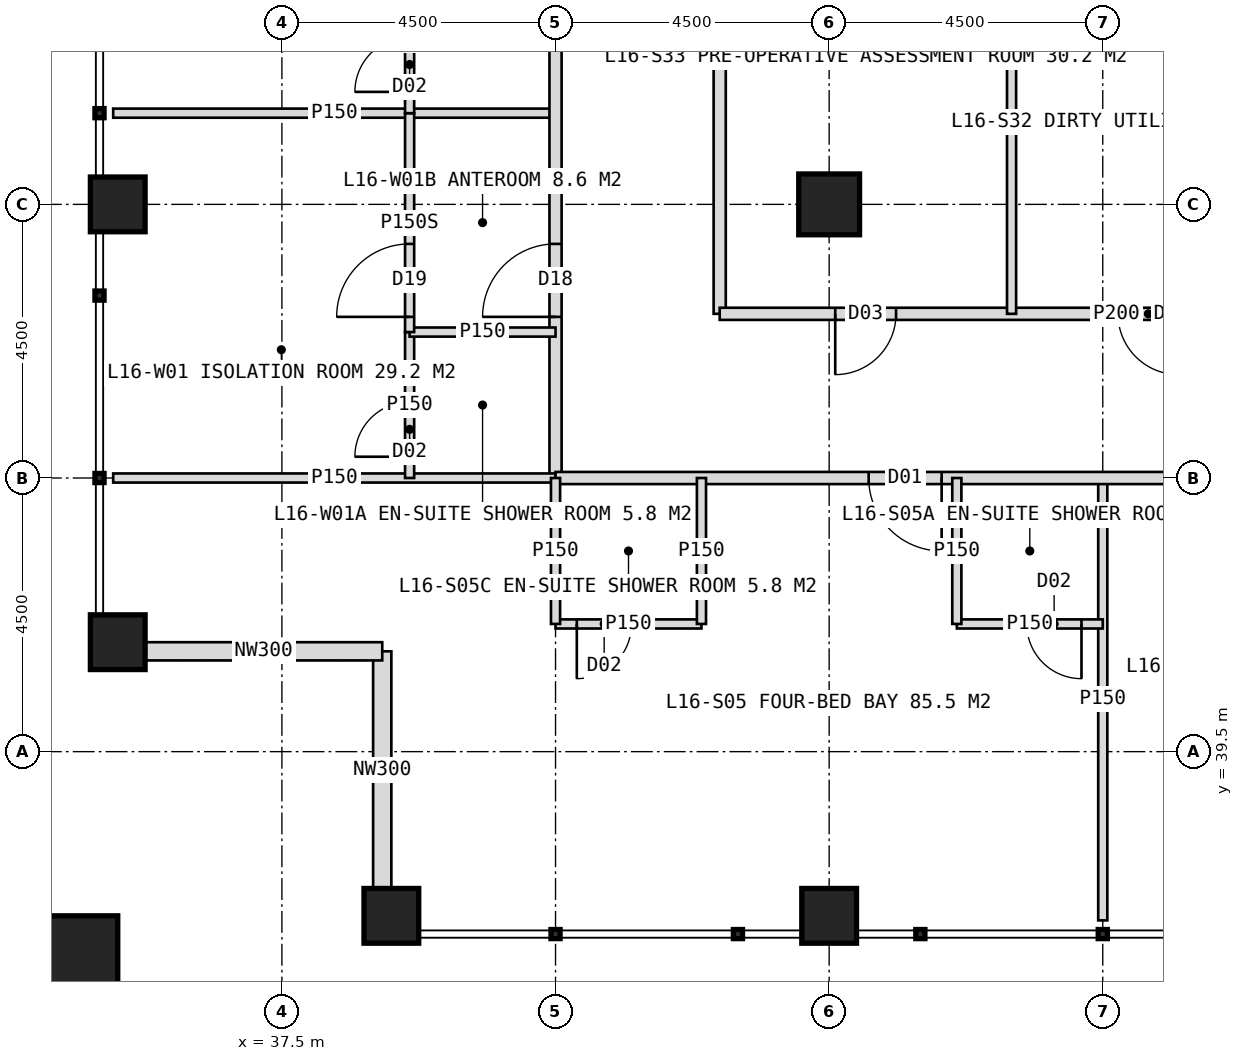
"""IFC4 building model, lengths in metres.
Left out: names, types, materials, properties, quantities, classifications, styles, units other than length and angle.
Written with IfcOpenShell. Run it as: python <this file> out.ifc"""

import sys

from ifc_helpers import new_model, si_unit, direction, frame, frame_2d, origin, origin_2d, place, context, subcontext, project, spatial, rectangle, hollow_rectangle, extrude, element, fill, save


model = new_model("IFC4")
c1 = context("Model", 3, precision=1e-05, world=origin(), true_north=direction((0.0, 1.0)))
c2 = subcontext(c1, "Body", "Model", "MODEL_VIEW")
j1 = project(units=[si_unit("LENGTHUNIT", "METRE"), si_unit("PLANEANGLEUNIT", "RADIAN")], contexts=[c1])
p1 = place(None, origin())
s1 = spatial("IfcSite", under=j1, at=p1, CompositionType="ELEMENT")
p2 = place(p1, origin())
s2 = spatial("IfcBuilding", under=s1, at=p2, CompositionType="ELEMENT")
p3 = place(p2, frame((0.0, 0.0, 71.0)))
s3 = spatial("IfcBuildingStorey", under=s2, at=p3, CompositionType="ELEMENT", Elevation=71.0)
p4 = place(p3, frame((46.5, 48.5, 0.0), z_axis=(0.0, 0.0, 1.0), x_axis=(1.0, 0.0, 0.0)))
e1 = element("IfcColumn", 1, at=p4, inside=s3, PredefinedType="COLUMN", context=c2, shape_type="SweptSolid", body=[
    extrude(hollow_rectangle(XDim=1.0, YDim=1.0, WallThickness=0.1, at=origin_2d()), origin(), (0.0, 0.0, 1.0), 4.0),
])
for number, where, z_axis, x_axis in (
    (2, (39.3, 36.8, 0.0), (0.0, 0.0, 1.0), (1.0, 0.0, 0.0)),
    (3, (34.8, 41.3, 0.0), (0.0, 0.0, 1.0), (1.0, 0.0, 0.0)),
    (4, (46.5, 36.8, 0.0), (0.0, 0.0, 1.0), (1.0, 0.0, 0.0)),
    (5, (34.8, 48.5, 0.0), (0.0, 0.0, 1.0), (1.0, 0.0, 0.0)),
):
    element("IfcColumn", number, at=place(p3, frame(where, z_axis=z_axis, x_axis=x_axis)), inside=s3, PredefinedType="COLUMN", context=c2, shape_type="SweptSolid", body=[
        extrude(hollow_rectangle(XDim=0.9, YDim=0.9, WallThickness=0.08, at=origin_2d()), origin(), (0.0, 0.0, 1.0), 4.0),
    ])
p5 = place(p3, frame((33.9, 35.9, 0.0), z_axis=(0.0, 0.0, 1.0), x_axis=(1.0, 0.0, 0.0)))
e6 = element("IfcColumn", 6, at=p5, inside=s3, PredefinedType="COLUMN", context=c2, shape_type="SweptSolid", body=[
    extrude(hollow_rectangle(XDim=1.8, YDim=1.8, WallThickness=0.1, at=origin_2d()), origin(), (0.0, 0.0, 1.0), 4.0),
])
for number, where, z_axis, x_axis in (
    (7, (39.15, 37.25, 0.0), (0.0, 0.0, 1.0), (0.0, 1.0, 0.0)),
    (8, (39.15, 41.15, 0.0), (0.0, 0.0, 1.0), (-1.0, 0.0, 0.0)),
):
    element("IfcWall", number, at=place(p3, frame(where, z_axis=z_axis, x_axis=x_axis)), inside=s3, PredefinedType="ELEMENTEDWALL", context=c2, shape_type="SweptSolid", body=[
        extrude(rectangle(XDim=3.9, YDim=0.3, at=frame_2d((1.95, 0.0))), origin(), (0.0, 0.0, 1.0), 2.95),
    ])
p6 = place(p3, frame((42.0, 50.0, 0.0), z_axis=(0.0, 0.0, 1.0), x_axis=(-1.0, 0.0, 0.0)))
e9 = element("IfcWall", 9, at=p6, inside=s3, PredefinedType="PARTITIONING", context=c2, shape_type="SweptSolid", body=[
    extrude(rectangle(XDim=7.275, YDim=0.15, at=frame_2d((3.637, 0.0))), origin(), (0.0, 0.0, 1.0), 3.75),
])
p7 = place(p3, frame((42.0, 44.0, 0.0), z_axis=(0.0, 0.0, 1.0), x_axis=(0.0, 1.0, 0.0)))
e10 = element("IfcWall", 10, at=p7, inside=s3, PredefinedType="PARTITIONING", context=c2, shape_type="SweptSolid", body=[
    extrude(rectangle(XDim=36.0, YDim=0.2, at=frame_2d((18.0, 0.0))), origin(), (0.0, 0.0, 1.0), 3.75),
])
p8 = place(p7, frame((2.65, 0.0, 0.0)))
e11 = element("IfcOpeningElement", 11, at=p8, cuts=e10, PredefinedType="OPENING", context=c2, shape_type="SweptSolid", body=[
    extrude(rectangle(XDim=1.2, YDim=2.2, at=frame_2d((0.6, 1.1))), frame((0.0, 0.11, 0.0), z_axis=(0.0, -1.0, 0.0), x_axis=(1.0, 0.0, 0.0)), (0.0, 0.0, 1.0), 0.22),
])
p9 = place(p7, frame((8.65, 0.0, 0.0)))
e12 = element("IfcOpeningElement", 12, at=p9, cuts=e10, PredefinedType="OPENING", context=c2, shape_type="SweptSolid", body=[
    extrude(rectangle(XDim=1.2, YDim=2.2, at=frame_2d((0.6, 1.1))), frame((0.0, 0.11, 0.0), z_axis=(0.0, -1.0, 0.0), x_axis=(1.0, 0.0, 0.0)), (0.0, 0.0, 1.0), 0.22),
])
p10 = place(p7, frame((14.65, 0.0, 0.0)))
e13 = element("IfcOpeningElement", 13, at=p10, cuts=e10, PredefinedType="OPENING", context=c2, shape_type="SweptSolid", body=[
    extrude(rectangle(XDim=1.2, YDim=2.2, at=frame_2d((0.6, 1.1))), frame((0.0, 0.11, 0.0), z_axis=(0.0, -1.0, 0.0), x_axis=(1.0, 0.0, 0.0)), (0.0, 0.0, 1.0), 0.22),
])
p11 = place(p7, frame((20.65, 0.0, 0.0)))
e14 = element("IfcOpeningElement", 14, at=p11, cuts=e10, PredefinedType="OPENING", context=c2, shape_type="SweptSolid", body=[
    extrude(rectangle(XDim=1.2, YDim=2.2, at=frame_2d((0.6, 1.1))), frame((0.0, 0.11, 0.0), z_axis=(0.0, -1.0, 0.0), x_axis=(1.0, 0.0, 0.0)), (0.0, 0.0, 1.0), 0.22),
])
p12 = place(p7, frame((26.65, 0.0, 0.0)))
e15 = element("IfcOpeningElement", 15, at=p12, cuts=e10, PredefinedType="OPENING", context=c2, shape_type="SweptSolid", body=[
    extrude(rectangle(XDim=1.2, YDim=2.2, at=frame_2d((0.6, 1.1))), frame((0.0, 0.11, 0.0), z_axis=(0.0, -1.0, 0.0), x_axis=(1.0, 0.0, 0.0)), (0.0, 0.0, 1.0), 0.22),
])
p13 = place(p7, frame((31.15, 0.0, 0.0)))
e16 = element("IfcOpeningElement", 16, at=p13, cuts=e10, PredefinedType="OPENING", context=c2, shape_type="SweptSolid", body=[
    extrude(rectangle(XDim=1.2, YDim=2.2, at=frame_2d((0.6, 1.1))), frame((0.0, 0.11, 0.0), z_axis=(0.0, -1.0, 0.0), x_axis=(1.0, 0.0, 0.0)), (0.0, 0.0, 1.0), 0.22),
])
p14 = place(p3, frame((42.0, 44.0, 0.0), z_axis=(0.0, 0.0, 1.0), x_axis=(-1.0, 0.0, 0.0)))
e17 = element("IfcWall", 17, at=p14, inside=s3, PredefinedType="PARTITIONING", context=c2, shape_type="SweptSolid", body=[
    extrude(rectangle(XDim=7.275, YDim=0.15, at=frame_2d((3.637, 0.0))), origin(), (0.0, 0.0, 1.0), 3.75),
])
p15 = place(p3, frame((39.6, 44.0, 0.0), z_axis=(0.0, 0.0, 1.0), x_axis=(0.0, 1.0, 0.0)))
e18 = element("IfcWall", 18, at=p15, inside=s3, PredefinedType="PARTITIONING", context=c2, shape_type="SweptSolid", body=[
    extrude(rectangle(XDim=2.4, YDim=0.15, at=frame_2d((1.2, 0.0))), origin(), (0.0, 0.0, 1.0), 3.75),
])
p16 = place(p15, frame((0.35, 0.0, 0.0)))
e19 = element("IfcOpeningElement", 19, at=p16, cuts=e18, PredefinedType="OPENING", context=c2, shape_type="SweptSolid", body=[
    extrude(rectangle(XDim=0.9, YDim=2.1, at=frame_2d((0.45, 1.05))), frame((0.0, 0.085, 0.0), z_axis=(0.0, -1.0, 0.0), x_axis=(1.0, 0.0, 0.0)), (0.0, 0.0, 1.0), 0.17),
])
p17 = place(p3, frame((42.0, 46.4, 0.0), z_axis=(0.0, 0.0, 1.0), x_axis=(-1.0, 0.0, 0.0)))
e20 = element("IfcWall", 20, at=p17, inside=s3, PredefinedType="PARTITIONING", context=c2, shape_type="SweptSolid", body=[
    extrude(rectangle(XDim=2.4, YDim=0.15, at=frame_2d((1.2, 0.0))), origin(), (0.0, 0.0, 1.0), 3.75),
])
p18 = place(p3, frame((39.6, 46.4, 0.0), z_axis=(0.0, 0.0, 1.0), x_axis=(0.0, 1.0, 0.0)))
e21 = element("IfcWall", 21, at=p18, inside=s3, PredefinedType="PARTITIONING", context=c2, shape_type="SweptSolid", body=[
    extrude(rectangle(XDim=3.6, YDim=0.15, at=frame_2d((1.8, 0.0))), origin(), (0.0, 0.0, 1.0), 3.75),
])
p19 = place(p18, frame((0.25, 0.0, 0.0)))
e22 = element("IfcOpeningElement", 22, at=p19, cuts=e21, PredefinedType="OPENING", context=c2, shape_type="SweptSolid", body=[
    extrude(rectangle(XDim=1.2, YDim=2.2, at=frame_2d((0.6, 1.1))), frame((0.0, 0.085, 0.0), z_axis=(0.0, -1.0, 0.0), x_axis=(1.0, 0.0, 0.0)), (0.0, 0.0, 1.0), 0.17),
])
p20 = place(p3, frame((39.6, 50.0, 0.0), z_axis=(0.0, 0.0, 1.0), x_axis=(0.0, 1.0, 0.0)))
e23 = element("IfcWall", 23, at=p20, inside=s3, PredefinedType="PARTITIONING", context=c2, shape_type="SweptSolid", body=[
    extrude(rectangle(XDim=2.4, YDim=0.15, at=frame_2d((1.2, 0.0))), origin(), (0.0, 0.0, 1.0), 3.75),
])
p21 = place(p20, frame((0.35, 0.0, 0.0)))
e24 = element("IfcOpeningElement", 24, at=p21, cuts=e23, PredefinedType="OPENING", context=c2, shape_type="SweptSolid", body=[
    extrude(rectangle(XDim=0.9, YDim=2.1, at=frame_2d((0.45, 1.05))), frame((0.0, 0.085, 0.0), z_axis=(0.0, -1.0, 0.0), x_axis=(1.0, 0.0, 0.0)), (0.0, 0.0, 1.0), 0.17),
])
p22 = place(p3, frame((44.7, 46.7, 0.0), z_axis=(0.0, 0.0, 1.0), x_axis=(0.0, 1.0, 0.0)))
e25 = element("IfcWall", 25, at=p22, inside=s3, PredefinedType="PARTITIONING", context=c2, shape_type="SweptSolid", body=[
    extrude(rectangle(XDim=11.3, YDim=0.2, at=frame_2d((5.65, 0.0))), origin(), (0.0, 0.0, 1.0), 3.75),
])
p23 = place(p22, frame((8.3, 0.0, 0.0)))
e26 = element("IfcOpeningElement", 26, at=p23, cuts=e25, PredefinedType="OPENING", context=c2, shape_type="SweptSolid", body=[
    extrude(rectangle(XDim=1.0, YDim=2.1, at=frame_2d((0.5, 1.05))), frame((0.0, 0.11, 0.0), z_axis=(0.0, -1.0, 0.0), x_axis=(1.0, 0.0, 0.0)), (0.0, 0.0, 1.0), 0.22),
])
p24 = place(p3, frame((51.0, 44.0, 0.0), z_axis=(0.0, 0.0, 1.0), x_axis=(0.0, -1.0, 0.0)))
e27 = element("IfcWall", 27, at=p24, inside=s3, PredefinedType="PARTITIONING", context=c2, shape_type="SweptSolid", body=[
    extrude(rectangle(XDim=7.275, YDim=0.15, at=frame_2d((3.637, 0.0))), origin(), (0.0, 0.0, 1.0), 3.75),
])
p25 = place(p3, frame((78.0, 44.0, 0.0), z_axis=(0.0, 0.0, 1.0), x_axis=(-1.0, 0.0, 0.0)))
e28 = element("IfcWall", 28, at=p25, inside=s3, PredefinedType="PARTITIONING", context=c2, shape_type="SweptSolid", body=[
    extrude(rectangle(XDim=36.0, YDim=0.2, at=frame_2d((18.0, 0.0))), origin(), (0.0, 0.0, 1.0), 3.75),
])
p26 = place(p25, frame((2.65, 0.0, 0.0)))
e29 = element("IfcOpeningElement", 29, at=p26, cuts=e28, PredefinedType="OPENING", context=c2, shape_type="SweptSolid", body=[
    extrude(rectangle(XDim=1.2, YDim=2.2, at=frame_2d((0.6, 1.1))), frame((0.0, 0.11, 0.0), z_axis=(0.0, -1.0, 0.0), x_axis=(1.0, 0.0, 0.0)), (0.0, 0.0, 1.0), 0.22),
])
p27 = place(p25, frame((8.65, 0.0, 0.0)))
e30 = element("IfcOpeningElement", 30, at=p27, cuts=e28, PredefinedType="OPENING", context=c2, shape_type="SweptSolid", body=[
    extrude(rectangle(XDim=1.2, YDim=2.2, at=frame_2d((0.6, 1.1))), frame((0.0, 0.11, 0.0), z_axis=(0.0, -1.0, 0.0), x_axis=(1.0, 0.0, 0.0)), (0.0, 0.0, 1.0), 0.22),
])
p28 = place(p25, frame((14.65, 0.0, 0.0)))
e31 = element("IfcOpeningElement", 31, at=p28, cuts=e28, PredefinedType="OPENING", context=c2, shape_type="SweptSolid", body=[
    extrude(rectangle(XDim=1.2, YDim=2.2, at=frame_2d((0.6, 1.1))), frame((0.0, 0.11, 0.0), z_axis=(0.0, -1.0, 0.0), x_axis=(1.0, 0.0, 0.0)), (0.0, 0.0, 1.0), 0.22),
])
p29 = place(p25, frame((21.25, 0.0, 0.0)))
e32 = element("IfcOpeningElement", 32, at=p29, cuts=e28, PredefinedType="OPENING", context=c2, shape_type="SweptSolid", body=[
    extrude(rectangle(XDim=1.2, YDim=2.2, at=frame_2d((0.6, 1.1))), frame((0.0, 0.11, 0.0), z_axis=(0.0, -1.0, 0.0), x_axis=(1.0, 0.0, 0.0)), (0.0, 0.0, 1.0), 0.22),
])
p30 = place(p25, frame((29.65, 0.0, 0.0)))
e33 = element("IfcOpeningElement", 33, at=p30, cuts=e28, PredefinedType="OPENING", context=c2, shape_type="SweptSolid", body=[
    extrude(rectangle(XDim=1.2, YDim=2.2, at=frame_2d((0.6, 1.1))), frame((0.0, 0.11, 0.0), z_axis=(0.0, -1.0, 0.0), x_axis=(1.0, 0.0, 0.0)), (0.0, 0.0, 1.0), 0.22),
])
p31 = place(p3, frame((51.0, 41.6, 0.0), z_axis=(0.0, 0.0, 1.0), x_axis=(-1.0, 0.0, 0.0)))
e34 = element("IfcWall", 34, at=p31, inside=s3, PredefinedType="PARTITIONING", context=c2, shape_type="SweptSolid", body=[
    extrude(rectangle(XDim=2.4, YDim=0.15, at=frame_2d((1.2, 0.0))), origin(), (0.0, 0.0, 1.0), 3.75),
])
p32 = place(p31, frame((0.35, 0.0, 0.0)))
e35 = element("IfcOpeningElement", 35, at=p32, cuts=e34, PredefinedType="OPENING", context=c2, shape_type="SweptSolid", body=[
    extrude(rectangle(XDim=0.9, YDim=2.1, at=frame_2d((0.45, 1.05))), frame((0.0, 0.085, 0.0), z_axis=(0.0, -1.0, 0.0), x_axis=(1.0, 0.0, 0.0)), (0.0, 0.0, 1.0), 0.17),
])
p33 = place(p3, frame((48.6, 44.0, 0.0), z_axis=(0.0, 0.0, 1.0), x_axis=(0.0, -1.0, 0.0)))
e36 = element("IfcWall", 36, at=p33, inside=s3, PredefinedType="PARTITIONING", context=c2, shape_type="SweptSolid", body=[
    extrude(rectangle(XDim=2.4, YDim=0.15, at=frame_2d((1.2, 0.0))), origin(), (0.0, 0.0, 1.0), 3.75),
])
p34 = place(p3, frame((44.4, 41.6, 0.0), z_axis=(0.0, 0.0, 1.0), x_axis=(-1.0, 0.0, 0.0)))
e37 = element("IfcWall", 37, at=p34, inside=s3, PredefinedType="PARTITIONING", context=c2, shape_type="SweptSolid", body=[
    extrude(rectangle(XDim=2.4, YDim=0.15, at=frame_2d((1.2, 0.0))), origin(), (0.0, 0.0, 1.0), 3.75),
])
p35 = place(p34, frame((1.15, 0.0, 0.0)))
e38 = element("IfcOpeningElement", 38, at=p35, cuts=e37, PredefinedType="OPENING", context=c2, shape_type="SweptSolid", body=[
    extrude(rectangle(XDim=0.9, YDim=2.1, at=frame_2d((0.45, 1.05))), frame((0.0, 0.085, 0.0), z_axis=(0.0, -1.0, 0.0), x_axis=(1.0, 0.0, 0.0)), (0.0, 0.0, 1.0), 0.17),
])
for number, where, z_axis, x_axis in (
    (39, (44.4, 44.0, 0.0), (0.0, 0.0, 1.0), (0.0, -1.0, 0.0)),
    (40, (42.0, 44.0, 0.0), (0.0, 0.0, 1.0), (0.0, -1.0, 0.0)),
):
    element("IfcWall", number, at=place(p3, frame(where, z_axis=z_axis, x_axis=x_axis)), inside=s3, PredefinedType="PARTITIONING", context=c2, shape_type="SweptSolid", body=[
        extrude(rectangle(XDim=2.4, YDim=0.15, at=frame_2d((1.2, 0.0))), origin(), (0.0, 0.0, 1.0), 3.75),
    ])
p36 = place(p3, frame((57.75, 46.7, 0.0), z_axis=(0.0, 0.0, 1.0), x_axis=(-1.0, 0.0, 0.0)))
e41 = element("IfcWall", 41, at=p36, inside=s3, PredefinedType="PARTITIONING", context=c2, shape_type="SweptSolid", body=[
    extrude(rectangle(XDim=13.05, YDim=0.2, at=frame_2d((6.525, 0.0))), origin(), (0.0, 0.0, 1.0), 3.75),
])
p37 = place(p36, frame((1.375, 0.0, 0.0)))
e42 = element("IfcOpeningElement", 42, at=p37, cuts=e41, PredefinedType="OPENING", context=c2, shape_type="SweptSolid", body=[
    extrude(rectangle(XDim=1.0, YDim=2.1, at=frame_2d((0.5, 1.05))), frame((0.0, 0.11, 0.0), z_axis=(0.0, -1.0, 0.0), x_axis=(1.0, 0.0, 0.0)), (0.0, 0.0, 1.0), 0.22),
])
p38 = place(p36, frame((5.5, 0.0, 0.0)))
e43 = element("IfcOpeningElement", 43, at=p38, cuts=e41, PredefinedType="OPENING", context=c2, shape_type="SweptSolid", body=[
    extrude(rectangle(XDim=1.0, YDim=2.1, at=frame_2d((0.5, 1.05))), frame((0.0, 0.11, 0.0), z_axis=(0.0, -1.0, 0.0), x_axis=(1.0, 0.0, 0.0)), (0.0, 0.0, 1.0), 0.22),
])
p39 = place(p36, frame((10.15, 0.0, 0.0)))
e44 = element("IfcOpeningElement", 44, at=p39, cuts=e41, PredefinedType="OPENING", context=c2, shape_type="SweptSolid", body=[
    extrude(rectangle(XDim=1.0, YDim=2.1, at=frame_2d((0.5, 1.05))), frame((0.0, 0.11, 0.0), z_axis=(0.0, -1.0, 0.0), x_axis=(1.0, 0.0, 0.0)), (0.0, 0.0, 1.0), 0.22),
])
p40 = place(p3, frame((49.5, 53.0, 0.0), z_axis=(0.0, 0.0, 1.0), x_axis=(0.0, -1.0, 0.0)))
e45 = element("IfcWall", 45, at=p40, inside=s3, PredefinedType="PARTITIONING", context=c2, shape_type="SweptSolid", body=[
    extrude(rectangle(XDim=6.3, YDim=0.15, at=frame_2d((3.15, 0.0))), origin(), (0.0, 0.0, 1.0), 3.75),
])
p41 = place(p19, origin())
e46 = element("IfcDoor", 46, at=p41, inside=s3, OperationType="SINGLE_SWING_LEFT", PredefinedType="DOOR", context=c2, shape_type="SweptSolid", body=[
    extrude(rectangle(XDim=1.2, YDim=2.2, at=frame_2d((0.6, 1.1))), frame((0.0, 0.025, 0.0), z_axis=(0.0, -1.0, 0.0), x_axis=(1.0, 0.0, 0.0)), (0.0, 0.0, 1.0), 0.05),
])
fill(e22, e46)
p42 = place(p8, origin())
e47 = element("IfcDoor", 47, at=p42, inside=s3, OperationType="SINGLE_SWING_LEFT", PredefinedType="DOOR", context=c2, shape_type="SweptSolid", body=[
    extrude(rectangle(XDim=1.2, YDim=2.2, at=frame_2d((0.6, 1.1))), frame((0.0, 0.025, 0.0), z_axis=(0.0, -1.0, 0.0), x_axis=(1.0, 0.0, 0.0)), (0.0, 0.0, 1.0), 0.05),
])
fill(e11, e47)
p43 = place(p16, origin())
e48 = element("IfcDoor", 48, at=p43, inside=s3, OperationType="SINGLE_SWING_LEFT", PredefinedType="DOOR", context=c2, shape_type="SweptSolid", body=[
    extrude(rectangle(XDim=0.9, YDim=2.1, at=frame_2d((0.45, 1.05))), frame((0.0, 0.025, 0.0), z_axis=(0.0, -1.0, 0.0), x_axis=(1.0, 0.0, 0.0)), (0.0, 0.0, 1.0), 0.05),
])
fill(e19, e48)
p44 = place(p21, origin())
e49 = element("IfcDoor", 49, at=p44, inside=s3, OperationType="SINGLE_SWING_LEFT", PredefinedType="DOOR", context=c2, shape_type="SweptSolid", body=[
    extrude(rectangle(XDim=0.9, YDim=2.1, at=frame_2d((0.45, 1.05))), frame((0.0, 0.025, 0.0), z_axis=(0.0, -1.0, 0.0), x_axis=(1.0, 0.0, 0.0)), (0.0, 0.0, 1.0), 0.05),
])
fill(e24, e49)
p45 = place(p30, origin())
e50 = element("IfcDoor", 50, at=p45, inside=s3, OperationType="SINGLE_SWING_LEFT", PredefinedType="DOOR", context=c2, shape_type="SweptSolid", body=[
    extrude(rectangle(XDim=1.2, YDim=2.2, at=frame_2d((0.6, 1.1))), frame((0.0, 0.025, 0.0), z_axis=(0.0, -1.0, 0.0), x_axis=(1.0, 0.0, 0.0)), (0.0, 0.0, 1.0), 0.05),
])
fill(e33, e50)
p46 = place(p32, origin())
e51 = element("IfcDoor", 51, at=p46, inside=s3, OperationType="SINGLE_SWING_LEFT", PredefinedType="DOOR", context=c2, shape_type="SweptSolid", body=[
    extrude(rectangle(XDim=0.9, YDim=2.1, at=frame_2d((0.45, 1.05))), frame((0.0, 0.025, 0.0), z_axis=(0.0, -1.0, 0.0), x_axis=(1.0, 0.0, 0.0)), (0.0, 0.0, 1.0), 0.05),
])
fill(e35, e51)
p47 = place(p35, origin())
e52 = element("IfcDoor", 52, at=p47, inside=s3, OperationType="SINGLE_SWING_RIGHT", PredefinedType="DOOR", context=c2, shape_type="SweptSolid", body=[
    extrude(rectangle(XDim=0.9, YDim=2.1, at=frame_2d((0.45, 1.05))), frame((0.0, 0.025, 0.0), z_axis=(0.0, -1.0, 0.0), x_axis=(1.0, 0.0, 0.0)), (0.0, 0.0, 1.0), 0.05),
])
fill(e38, e52)
p48 = place(p38, origin())
e53 = element("IfcDoor", 53, at=p48, inside=s3, OperationType="SINGLE_SWING_LEFT", PredefinedType="DOOR", context=c2, shape_type="SweptSolid", body=[
    extrude(rectangle(XDim=1.0, YDim=2.1, at=frame_2d((0.5, 1.05))), frame((0.0, 0.025, 0.0), z_axis=(0.0, -1.0, 0.0), x_axis=(1.0, 0.0, 0.0)), (0.0, 0.0, 1.0), 0.05),
])
fill(e43, e53)
p49 = place(p39, origin())
e54 = element("IfcDoor", 54, at=p49, inside=s3, OperationType="SINGLE_SWING_RIGHT", PredefinedType="DOOR", context=c2, shape_type="SweptSolid", body=[
    extrude(rectangle(XDim=1.0, YDim=2.1, at=frame_2d((0.5, 1.05))), frame((0.0, 0.025, 0.0), z_axis=(0.0, -1.0, 0.0), x_axis=(1.0, 0.0, 0.0)), (0.0, 0.0, 1.0), 0.05),
])
fill(e44, e54)
save(model, sys.argv[1])
